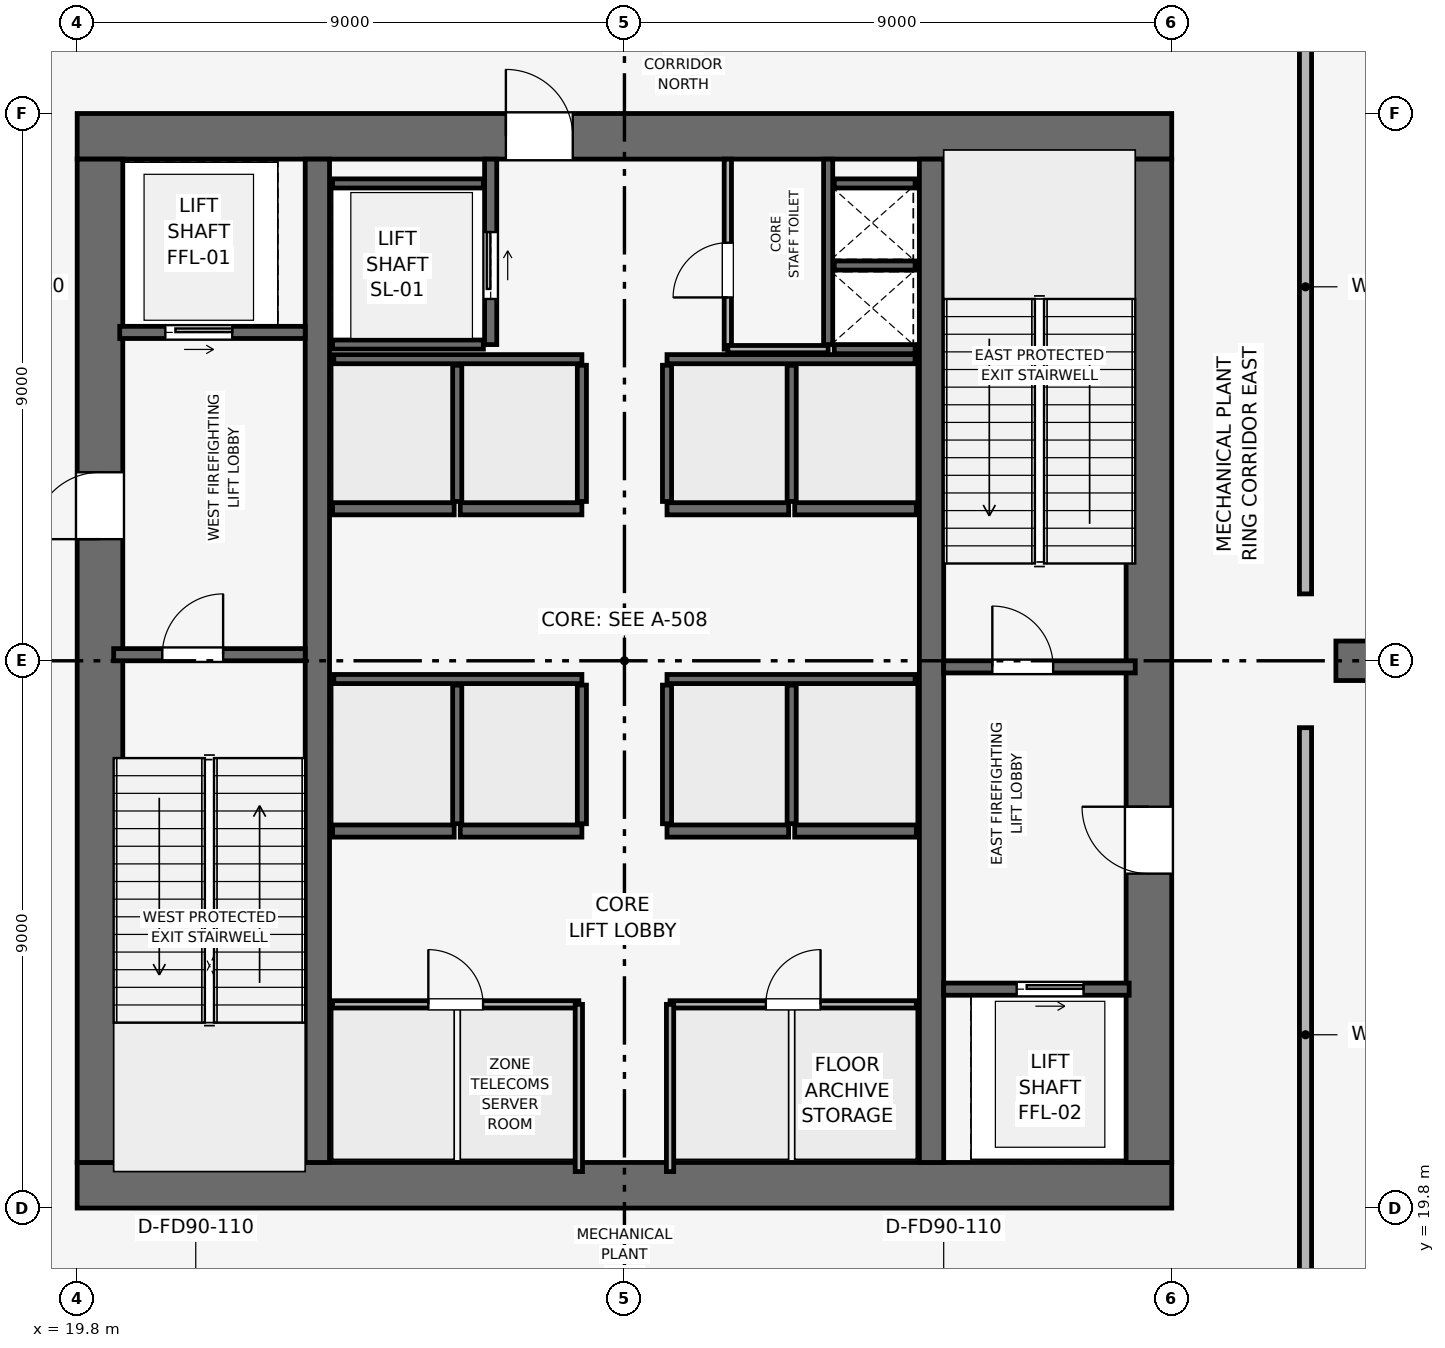
"""IFC4 building model, lengths in metres.
Left out: names, types, materials, properties, quantities, classifications, styles, units other than length and angle.
Written with IfcOpenShell. Run it as: python <this file> out.ifc"""

import sys

from ifc_helpers import new_model, si_unit, direction, frame, frame_2d, origin, place, context, subcontext, project, spatial, rectangle, extrude, element, fill, save


model = new_model("IFC4")
c1 = context("Model", 3, precision=1e-05, world=origin(), true_north=direction((0.0, 1.0)))
c2 = subcontext(c1, "Body", "Model", "MODEL_VIEW")
j1 = project(units=[si_unit("LENGTHUNIT", "METRE"), si_unit("PLANEANGLEUNIT", "RADIAN")], contexts=[c1])
p1 = place(None, origin())
s1 = spatial("IfcSite", under=j1, at=p1, CompositionType="ELEMENT")
p2 = place(p1, origin())
s2 = spatial("IfcBuilding", under=s1, at=p2, CompositionType="ELEMENT")
p3 = place(p2, frame((0.0, 0.0, 194.55)))
s3 = spatial("IfcBuildingStorey", under=s2, at=p3, CompositionType="ELEMENT", Elevation=194.55)
p4 = place(p3, frame((19.8, 20.175, 0.0), z_axis=(0.0, 0.0, 1.0), x_axis=(1.0, 0.0, 0.0)))
e1 = element("IfcWall", 1, at=p4, inside=s3, PredefinedType="SHEAR", context=c2, shape_type="SweptSolid", body=[
    extrude(rectangle(XDim=18.0, YDim=0.75, at=frame_2d((9.0, 0.0))), origin(), (0.0, 0.0, 1.0), 5.4),
])
p5 = place(p3, frame((19.8, 37.425, 0.0), z_axis=(0.0, 0.0, 1.0), x_axis=(1.0, 0.0, 0.0)))
e2 = element("IfcWall", 2, at=p5, inside=s3, PredefinedType="SHEAR", context=c2, shape_type="SweptSolid", body=[
    extrude(rectangle(XDim=18.0, YDim=0.75, at=frame_2d((9.0, 0.0))), origin(), (0.0, 0.0, 1.0), 5.4),
])
p6 = place(p5, frame((7.05, 0.0, 0.0)))
e3 = element("IfcOpeningElement", 3, at=p6, cuts=e2, PredefinedType="OPENING", context=c2, shape_type="SweptSolid", body=[
    extrude(rectangle(XDim=1.1, YDim=2.15, at=frame_2d((0.55, 1.075))), frame((0.0, 0.385, 0.0), z_axis=(0.0, -1.0, 0.0), x_axis=(1.0, 0.0, 0.0)), (0.0, 0.0, 1.0), 0.77),
])
p7 = place(p3, frame((20.175, 20.55, 0.0), z_axis=(0.0, 0.0, 1.0), x_axis=(0.0, 1.0, 0.0)))
e4 = element("IfcWall", 4, at=p7, inside=s3, PredefinedType="SHEAR", context=c2, shape_type="SweptSolid", body=[
    extrude(rectangle(XDim=16.5, YDim=0.75, at=frame_2d((8.25, 0.0))), origin(), (0.0, 0.0, 1.0), 5.4),
])
p8 = place(p7, frame((10.25, 0.0, 0.0)))
e5 = element("IfcOpeningElement", 5, at=p8, cuts=e4, PredefinedType="OPENING", context=c2, shape_type="SweptSolid", body=[
    extrude(rectangle(XDim=1.1, YDim=2.15, at=frame_2d((0.55, 1.075))), frame((0.0, 0.385, 0.0), z_axis=(0.0, -1.0, 0.0), x_axis=(1.0, 0.0, 0.0)), (0.0, 0.0, 1.0), 0.77),
])
p9 = place(p3, frame((37.425, 20.55, 0.0), z_axis=(0.0, 0.0, 1.0), x_axis=(0.0, 1.0, 0.0)))
e6 = element("IfcWall", 6, at=p9, inside=s3, PredefinedType="SHEAR", context=c2, shape_type="SweptSolid", body=[
    extrude(rectangle(XDim=16.5, YDim=0.75, at=frame_2d((8.25, 0.0))), origin(), (0.0, 0.0, 1.0), 5.4),
])
p10 = place(p9, frame((4.75, 0.0, 0.0)))
e7 = element("IfcOpeningElement", 7, at=p10, cuts=e6, PredefinedType="OPENING", context=c2, shape_type="SweptSolid", body=[
    extrude(rectangle(XDim=1.1, YDim=2.15, at=frame_2d((0.55, 1.075))), frame((0.0, 0.385, 0.0), z_axis=(0.0, -1.0, 0.0), x_axis=(1.0, 0.0, 0.0)), (0.0, 0.0, 1.0), 0.77),
])
for number, where, z_axis, x_axis in (
    (8, (23.75, 20.55, 0.0), (0.0, 0.0, 1.0), (0.0, 1.0, 0.0)),
    (9, (33.85, 20.55, 0.0), (0.0, 0.0, 1.0), (0.0, 1.0, 0.0)),
):
    element("IfcWall", number, at=place(p3, frame(where, z_axis=z_axis, x_axis=x_axis)), inside=s3, PredefinedType="SHEAR", context=c2, shape_type="SweptSolid", body=[
        extrude(rectangle(XDim=16.5, YDim=0.4, at=frame_2d((8.25, 0.0))), origin(), (0.0, 0.0, 1.0), 5.4),
    ])
p11 = place(p3, frame((40.5, 28.8, 0.0), z_axis=(0.0, 0.0, 1.0), x_axis=(1.0, 0.0, 0.0)))
e10 = element("IfcWall", 10, at=p11, inside=s3, PredefinedType="SHEAR", context=c2, shape_type="SweptSolid", body=[
    extrude(rectangle(XDim=12.35, YDim=0.65, at=frame_2d((6.175, 0.0))), origin(), (0.0, 0.0, 1.0), 5.15),
])
p12 = place(p3, frame((20.4, 28.9, 0.0), z_axis=(0.0, 0.0, 1.0), x_axis=(1.0, 0.0, 0.0)))
e11 = element("IfcWall", 11, at=p12, inside=s3, PredefinedType="SHEAR", context=c2, shape_type="SweptSolid", body=[
    extrude(rectangle(XDim=3.15, YDim=0.2, at=frame_2d((1.575, 0.0))), origin(), (0.0, 0.0, 1.0), 5.15),
])
p13 = place(p12, frame((0.8, 0.0, 0.0)))
e12 = element("IfcOpeningElement", 12, at=p13, cuts=e11, PredefinedType="OPENING", context=c2, shape_type="SweptSolid", body=[
    extrude(rectangle(XDim=1.0, YDim=2.1, at=frame_2d((0.5, 1.05))), frame((0.0, 0.11, 0.0), z_axis=(0.0, -1.0, 0.0), x_axis=(1.0, 0.0, 0.0)), (0.0, 0.0, 1.0), 0.22),
])
p14 = place(p3, frame((34.05, 28.7, 0.0), z_axis=(0.0, 0.0, 1.0), x_axis=(1.0, 0.0, 0.0)))
e13 = element("IfcWall", 13, at=p14, inside=s3, PredefinedType="SHEAR", context=c2, shape_type="SweptSolid", body=[
    extrude(rectangle(XDim=3.15, YDim=0.2, at=frame_2d((1.575, 0.0))), origin(), (0.0, 0.0, 1.0), 5.15),
])
p15 = place(p14, frame((0.8, 0.0, 0.0)))
e14 = element("IfcOpeningElement", 14, at=p15, cuts=e13, PredefinedType="OPENING", context=c2, shape_type="SweptSolid", body=[
    extrude(rectangle(XDim=1.0, YDim=2.1, at=frame_2d((0.5, 1.05))), frame((0.0, 0.11, 0.0), z_axis=(0.0, -1.0, 0.0), x_axis=(1.0, 0.0, 0.0)), (0.0, 0.0, 1.0), 0.22),
])
p16 = place(p3, frame((32.15, 34.0, 0.0), z_axis=(0.0, 0.0, 1.0), x_axis=(0.0, 1.0, 0.0)))
e15 = element("IfcWall", 15, at=p16, inside=s3, PredefinedType="SHEAR", context=c2, shape_type="SweptSolid", body=[
    extrude(rectangle(XDim=3.05, YDim=0.15, at=frame_2d((1.525, 0.0))), origin(), (0.0, 0.0, 1.0), 5.15),
])
for number, where, z_axis, x_axis in (
    (16, (32.25, 33.925, 0.0), (0.0, 0.0, 1.0), (1.0, 0.0, 0.0)),
    (17, (32.25, 35.3, 0.0), (0.0, 0.0, 1.0), (1.0, 0.0, 0.0)),
):
    element("IfcWall", number, at=place(p3, frame(where, z_axis=z_axis, x_axis=x_axis)), inside=s3, PredefinedType="SHEAR", context=c2, shape_type="SweptSolid", body=[
        extrude(rectangle(XDim=1.33, YDim=0.15, at=frame_2d((0.665, 0.0))), origin(), (0.0, 0.0, 1.0), 5.15),
    ])
p17 = place(p3, frame((20.5, 34.2, 0.0), z_axis=(0.0, 0.0, 1.0), x_axis=(1.0, 0.0, 0.0)))
e18 = element("IfcWall", 18, at=p17, inside=s3, PredefinedType="SHEAR", context=c2, shape_type="SweptSolid", body=[
    extrude(rectangle(XDim=3.05, YDim=0.2, at=frame_2d((1.525, 0.0))), origin(), (0.0, 0.0, 1.0), 5.15),
])
p18 = place(p17, frame((0.75, 0.0, 0.0)))
e19 = element("IfcOpeningElement", 19, at=p18, cuts=e18, PredefinedType="OPENING", context=c2, shape_type="SweptSolid", body=[
    extrude(rectangle(XDim=1.1, YDim=2.15, at=frame_2d((0.55, 1.075))), frame((0.0, 0.11, 0.0), z_axis=(0.0, -1.0, 0.0), x_axis=(1.0, 0.0, 0.0)), (0.0, 0.0, 1.0), 0.22),
])
p19 = place(p3, frame((34.05, 23.4, 0.0), z_axis=(0.0, 0.0, 1.0), x_axis=(1.0, 0.0, 0.0)))
e20 = element("IfcWall", 20, at=p19, inside=s3, PredefinedType="SHEAR", context=c2, shape_type="SweptSolid", body=[
    extrude(rectangle(XDim=3.05, YDim=0.2, at=frame_2d((1.525, 0.0))), origin(), (0.0, 0.0, 1.0), 5.15),
])
p20 = place(p19, frame((1.2, 0.0, 0.0)))
e21 = element("IfcOpeningElement", 21, at=p20, cuts=e20, PredefinedType="OPENING", context=c2, shape_type="SweptSolid", body=[
    extrude(rectangle(XDim=1.1, YDim=2.15, at=frame_2d((0.55, 1.075))), frame((0.0, 0.11, 0.0), z_axis=(0.0, -1.0, 0.0), x_axis=(1.0, 0.0, 0.0)), (0.0, 0.0, 1.0), 0.22),
])
p21 = place(p3, frame((26.6, 34.0, 0.0), z_axis=(0.0, 0.0, 1.0), x_axis=(0.0, 1.0, 0.0)))
e22 = element("IfcWall", 22, at=p21, inside=s3, PredefinedType="SHEAR", context=c2, shape_type="SweptSolid", body=[
    extrude(rectangle(XDim=3.05, YDim=0.2, at=frame_2d((1.525, 0.0))), origin(), (0.0, 0.0, 1.0), 5.15),
])
p22 = place(p21, frame((0.75, 0.0, 0.0)))
e23 = element("IfcOpeningElement", 23, at=p22, cuts=e22, PredefinedType="OPENING", context=c2, shape_type="SweptSolid", body=[
    extrude(rectangle(XDim=1.1, YDim=2.15, at=frame_2d((0.55, 1.075))), frame((0.0, 0.11, 0.0), z_axis=(0.0, -1.0, 0.0), x_axis=(1.0, 0.0, 0.0)), (0.0, 0.0, 1.0), 0.22),
])
for number, where, z_axis, x_axis in (
    (24, (24.0, 34.0, 0.0), (0.0, 0.0, 1.0), (1.0, 0.0, 0.0)),
    (25, (24.0, 36.65, 0.0), (0.0, 0.0, 1.0), (1.0, 0.0, 0.0)),
):
    element("IfcWall", number, at=place(p3, frame(where, z_axis=z_axis, x_axis=x_axis)), inside=s3, PredefinedType="SHEAR", context=c2, shape_type="SweptSolid", body=[
        extrude(rectangle(XDim=2.48, YDim=0.15, at=frame_2d((1.24, 0.0))), origin(), (0.0, 0.0, 1.0), 5.15),
    ])
for number, where, z_axis, x_axis in (
    (26, (24.0, 26.0, 0.0), (0.0, 0.0, 1.0), (1.0, 0.0, 0.0)),
    (27, (26.1, 26.0, 0.0), (0.0, 0.0, 1.0), (1.0, 0.0, 0.0)),
    (28, (29.5, 26.0, 0.0), (0.0, 0.0, 1.0), (1.0, 0.0, 0.0)),
    (29, (31.6, 26.0, 0.0), (0.0, 0.0, 1.0), (1.0, 0.0, 0.0)),
    (30, (24.0, 31.3, 0.0), (0.0, 0.0, 1.0), (1.0, 0.0, 0.0)),
    (31, (26.1, 31.3, 0.0), (0.0, 0.0, 1.0), (1.0, 0.0, 0.0)),
    (32, (29.5, 31.3, 0.0), (0.0, 0.0, 1.0), (1.0, 0.0, 0.0)),
    (33, (31.6, 31.3, 0.0), (0.0, 0.0, 1.0), (1.0, 0.0, 0.0)),
):
    element("IfcWall", number, at=place(p3, frame(where, z_axis=z_axis, x_axis=x_axis)), inside=s3, PredefinedType="SHEAR", context=c2, shape_type="SweptSolid", body=[
        extrude(rectangle(XDim=2.0, YDim=0.2, at=frame_2d((1.0, 0.0))), origin(), (0.0, 0.0, 1.0), 5.15),
    ])
p23 = place(p3, frame((32.25, 36.65, 0.0), z_axis=(0.0, 0.0, 1.0), x_axis=(1.0, 0.0, 0.0)))
e34 = element("IfcWall", 34, at=p23, inside=s3, PredefinedType="SHEAR", context=c2, shape_type="SweptSolid", body=[
    extrude(rectangle(XDim=1.33, YDim=0.15, at=frame_2d((0.665, 0.0))), origin(), (0.0, 0.0, 1.0), 5.15),
])
for number, where, z_axis, x_axis in (
    (35, (24.02, 28.5, 0.0), (0.0, 0.0, 1.0), (1.0, 0.0, 0.0)),
    (36, (29.5, 28.5, 0.0), (0.0, 0.0, 1.0), (1.0, 0.0, 0.0)),
):
    element("IfcWall", number, at=place(p3, frame(where, z_axis=z_axis, x_axis=x_axis)), inside=s3, PredefinedType="SHEAR", context=c2, shape_type="SweptSolid", body=[
        extrude(rectangle(XDim=4.08, YDim=0.15, at=frame_2d((2.04, 0.0))), origin(), (0.0, 0.0, 1.0), 5.15),
    ])
for number, where, z_axis, x_axis in (
    (37, (26.05, 26.12, 0.0), (0.0, 0.0, 1.0), (0.0, 1.0, 0.0)),
    (38, (28.1, 26.12, 0.0), (0.0, 0.0, 1.0), (0.0, 1.0, 0.0)),
    (39, (29.5, 26.12, 0.0), (0.0, 0.0, 1.0), (0.0, 1.0, 0.0)),
    (40, (31.55, 26.12, 0.0), (0.0, 0.0, 1.0), (0.0, 1.0, 0.0)),
):
    element("IfcWall", number, at=place(p3, frame(where, z_axis=z_axis, x_axis=x_axis)), inside=s3, PredefinedType="SHEAR", context=c2, shape_type="SweptSolid", body=[
        extrude(rectangle(XDim=2.28, YDim=0.15, at=frame_2d((1.14, 0.0))), origin(), (0.0, 0.0, 1.0), 5.15),
    ])
for number, where, z_axis, x_axis in (
    (41, (24.02, 33.76, 0.0), (0.0, 0.0, 1.0), (1.0, 0.0, 0.0)),
    (42, (29.5, 33.76, 0.0), (0.0, 0.0, 1.0), (1.0, 0.0, 0.0)),
):
    element("IfcWall", number, at=place(p3, frame(where, z_axis=z_axis, x_axis=x_axis)), inside=s3, PredefinedType="SHEAR", context=c2, shape_type="SweptSolid", body=[
        extrude(rectangle(XDim=4.08, YDim=0.15, at=frame_2d((2.04, 0.0))), origin(), (0.0, 0.0, 1.0), 5.15),
    ])
for number, where, z_axis, x_axis in (
    (43, (26.05, 31.42, 0.0), (0.0, 0.0, 1.0), (0.0, 1.0, 0.0)),
    (44, (28.1, 31.42, 0.0), (0.0, 0.0, 1.0), (0.0, 1.0, 0.0)),
    (45, (29.5, 31.42, 0.0), (0.0, 0.0, 1.0), (0.0, 1.0, 0.0)),
    (46, (31.55, 31.42, 0.0), (0.0, 0.0, 1.0), (0.0, 1.0, 0.0)),
):
    element("IfcWall", number, at=place(p3, frame(where, z_axis=z_axis, x_axis=x_axis)), inside=s3, PredefinedType="SHEAR", context=c2, shape_type="SweptSolid", body=[
        extrude(rectangle(XDim=2.24, YDim=0.15, at=frame_2d((1.12, 0.0))), origin(), (0.0, 0.0, 1.0), 5.15),
    ])
p24 = place(p3, frame((30.5, 33.925, 0.0), z_axis=(0.0, 0.0, 1.0), x_axis=(0.0, 1.0, 0.0)))
e47 = element("IfcWall", 47, at=p24, inside=s3, PredefinedType="PARTITIONING", context=c2, shape_type="SweptSolid", body=[
    extrude(rectangle(XDim=3.125, YDim=0.12, at=frame_2d((1.562, 0.0))), origin(), (0.0, 0.0, 1.0), 5.15),
])
p25 = place(p24, frame((0.85, 0.0, 0.0)))
e48 = element("IfcOpeningElement", 48, at=p25, cuts=e47, PredefinedType="OPENING", context=c2, shape_type="SweptSolid", body=[
    extrude(rectangle(XDim=0.9, YDim=2.1, at=frame_2d((0.45, 1.05))), frame((0.0, 0.07, 0.0), z_axis=(0.0, -1.0, 0.0), x_axis=(1.0, 0.0, 0.0)), (0.0, 0.0, 1.0), 0.14),
])
p26 = place(p3, frame((30.5, 33.925, 0.0), z_axis=(0.0, 0.0, 1.0), x_axis=(1.0, 0.0, 0.0)))
e49 = element("IfcWall", 49, at=p26, inside=s3, PredefinedType="PARTITIONING", context=c2, shape_type="SweptSolid", body=[
    extrude(rectangle(XDim=1.65, YDim=0.12, at=frame_2d((0.825, 0.0))), origin(), (0.0, 0.0, 1.0), 5.15),
])
p27 = place(p3, frame((24.0, 23.15, 0.0), z_axis=(0.0, 0.0, 1.0), x_axis=(1.0, 0.0, 0.0)))
e50 = element("IfcWall", 50, at=p27, inside=s3, PredefinedType="PARTITIONING", context=c2, shape_type="SweptSolid", body=[
    extrude(rectangle(XDim=4.05, YDim=0.12, at=frame_2d((2.025, 0.0))), origin(), (0.0, 0.0, 1.0), 5.15),
])
p28 = place(p27, frame((1.575, 0.0, 0.0)))
e51 = element("IfcOpeningElement", 51, at=p28, cuts=e50, PredefinedType="OPENING", context=c2, shape_type="SweptSolid", body=[
    extrude(rectangle(XDim=0.9, YDim=2.1, at=frame_2d((0.45, 1.05))), frame((0.0, 0.07, 0.0), z_axis=(0.0, -1.0, 0.0), x_axis=(1.0, 0.0, 0.0)), (0.0, 0.0, 1.0), 0.14),
])
p29 = place(p3, frame((28.05, 20.4, 0.0), z_axis=(0.0, 0.0, 1.0), x_axis=(0.0, 1.0, 0.0)))
e52 = element("IfcWall", 52, at=p29, inside=s3, PredefinedType="PARTITIONING", context=c2, shape_type="SweptSolid", body=[
    extrude(rectangle(XDim=2.75, YDim=0.12, at=frame_2d((1.375, 0.0))), origin(), (0.0, 0.0, 1.0), 5.15),
])
p30 = place(p3, frame((29.55, 23.15, 0.0), z_axis=(0.0, 0.0, 1.0), x_axis=(1.0, 0.0, 0.0)))
e53 = element("IfcWall", 53, at=p30, inside=s3, PredefinedType="PARTITIONING", context=c2, shape_type="SweptSolid", body=[
    extrude(rectangle(XDim=4.05, YDim=0.12, at=frame_2d((2.025, 0.0))), origin(), (0.0, 0.0, 1.0), 5.15),
])
p31 = place(p30, frame((1.575, 0.0, 0.0)))
e54 = element("IfcOpeningElement", 54, at=p31, cuts=e53, PredefinedType="OPENING", context=c2, shape_type="SweptSolid", body=[
    extrude(rectangle(XDim=0.9, YDim=2.1, at=frame_2d((0.45, 1.05))), frame((0.0, 0.07, 0.0), z_axis=(0.0, -1.0, 0.0), x_axis=(1.0, 0.0, 0.0)), (0.0, 0.0, 1.0), 0.14),
])
p32 = place(p3, frame((29.55, 20.4, 0.0), z_axis=(0.0, 0.0, 1.0), x_axis=(0.0, 1.0, 0.0)))
e55 = element("IfcWall", 55, at=p32, inside=s3, PredefinedType="PARTITIONING", context=c2, shape_type="SweptSolid", body=[
    extrude(rectangle(XDim=2.75, YDim=0.12, at=frame_2d((1.375, 0.0))), origin(), (0.0, 0.0, 1.0), 5.15),
])
p33 = place(p3, frame((40.0, 17.6, 0.0), z_axis=(0.0, 0.0, 1.0), x_axis=(0.0, 1.0, 0.0)))
e56 = element("IfcWall", 56, at=p33, inside=s3, PredefinedType="PARTITIONING", context=c2, shape_type="SweptSolid", body=[
    extrude(rectangle(XDim=10.1, YDim=0.2, at=frame_2d((5.05, 0.0))), origin(), (0.0, 0.0, 1.0), 4.685),
])
p34 = place(p3, frame((40.0, 29.9, 0.0), z_axis=(0.0, 0.0, 1.0), x_axis=(0.0, 1.0, 0.0)))
e57 = element("IfcWall", 57, at=p34, inside=s3, PredefinedType="PARTITIONING", context=c2, shape_type="SweptSolid", body=[
    extrude(rectangle(XDim=10.1, YDim=0.2, at=frame_2d((5.05, 0.0))), origin(), (0.0, 0.0, 1.0), 4.685),
])
p35 = place(p13, origin())
e58 = element("IfcDoor", 58, at=p35, inside=s3, OperationType="SINGLE_SWING_RIGHT", PredefinedType="DOOR", context=c2, shape_type="SweptSolid", body=[
    extrude(rectangle(XDim=1.0, YDim=2.1, at=frame_2d((0.5, 1.05))), frame((0.0, 0.025, 0.0), z_axis=(0.0, -1.0, 0.0), x_axis=(1.0, 0.0, 0.0)), (0.0, 0.0, 1.0), 0.05),
])
fill(e12, e58)
p36 = place(p15, origin())
e59 = element("IfcDoor", 59, at=p36, inside=s3, OperationType="SINGLE_SWING_LEFT", PredefinedType="DOOR", context=c2, shape_type="SweptSolid", body=[
    extrude(rectangle(XDim=1.0, YDim=2.1, at=frame_2d((0.5, 1.05))), frame((0.0, 0.025, 0.0), z_axis=(0.0, -1.0, 0.0), x_axis=(1.0, 0.0, 0.0)), (0.0, 0.0, 1.0), 0.05),
])
fill(e14, e59)
p37 = place(p18, origin())
e60 = element("IfcDoor", 60, at=p37, inside=s3, OperationType="SLIDING_TO_RIGHT", PredefinedType="DOOR", context=c2, shape_type="SweptSolid", body=[
    extrude(rectangle(XDim=1.1, YDim=2.15, at=frame_2d((0.55, 1.075))), frame((0.0, 0.025, 0.0), z_axis=(0.0, -1.0, 0.0), x_axis=(1.0, 0.0, 0.0)), (0.0, 0.0, 1.0), 0.05),
])
fill(e19, e60)
p38 = place(p20, origin())
e61 = element("IfcDoor", 61, at=p38, inside=s3, OperationType="SLIDING_TO_RIGHT", PredefinedType="DOOR", context=c2, shape_type="SweptSolid", body=[
    extrude(rectangle(XDim=1.1, YDim=2.15, at=frame_2d((0.55, 1.075))), frame((0.0, 0.025, 0.0), z_axis=(0.0, -1.0, 0.0), x_axis=(1.0, 0.0, 0.0)), (0.0, 0.0, 1.0), 0.05),
])
fill(e21, e61)
p39 = place(p22, origin())
e62 = element("IfcDoor", 62, at=p39, inside=s3, OperationType="SLIDING_TO_RIGHT", PredefinedType="DOOR", context=c2, shape_type="SweptSolid", body=[
    extrude(rectangle(XDim=1.1, YDim=2.15, at=frame_2d((0.55, 1.075))), frame((0.0, 0.025, 0.0), z_axis=(0.0, -1.0, 0.0), x_axis=(1.0, 0.0, 0.0)), (0.0, 0.0, 1.0), 0.05),
])
fill(e23, e62)
p40 = place(p25, origin())
e63 = element("IfcDoor", 63, at=p40, inside=s3, OperationType="SINGLE_SWING_LEFT", PredefinedType="DOOR", context=c2, shape_type="SweptSolid", body=[
    extrude(rectangle(XDim=0.9, YDim=2.1, at=frame_2d((0.45, 1.05))), frame((0.0, 0.025, 0.0), z_axis=(0.0, -1.0, 0.0), x_axis=(1.0, 0.0, 0.0)), (0.0, 0.0, 1.0), 0.05),
])
fill(e48, e63)
p41 = place(p28, origin())
e64 = element("IfcDoor", 64, at=p41, inside=s3, OperationType="SINGLE_SWING_LEFT", PredefinedType="DOOR", context=c2, shape_type="SweptSolid", body=[
    extrude(rectangle(XDim=0.9, YDim=2.1, at=frame_2d((0.45, 1.05))), frame((0.0, 0.025, 0.0), z_axis=(0.0, -1.0, 0.0), x_axis=(1.0, 0.0, 0.0)), (0.0, 0.0, 1.0), 0.05),
])
fill(e51, e64)
p42 = place(p31, origin())
e65 = element("IfcDoor", 65, at=p42, inside=s3, OperationType="SINGLE_SWING_RIGHT", PredefinedType="DOOR", context=c2, shape_type="SweptSolid", body=[
    extrude(rectangle(XDim=0.9, YDim=2.1, at=frame_2d((0.45, 1.05))), frame((0.0, 0.025, 0.0), z_axis=(0.0, -1.0, 0.0), x_axis=(1.0, 0.0, 0.0)), (0.0, 0.0, 1.0), 0.05),
])
fill(e54, e65)
p43 = place(p8, origin())
e66 = element("IfcDoor", 66, at=p43, inside=s3, OperationType="SINGLE_SWING_LEFT", PredefinedType="DOOR", context=c2, shape_type="SweptSolid", body=[
    extrude(rectangle(XDim=1.1, YDim=2.15, at=frame_2d((0.55, 1.075))), frame((0.0, 0.025, 0.0), z_axis=(0.0, -1.0, 0.0), x_axis=(1.0, 0.0, 0.0)), (0.0, 0.0, 1.0), 0.05),
])
fill(e5, e66)
p44 = place(p10, origin())
e67 = element("IfcDoor", 67, at=p44, inside=s3, OperationType="SINGLE_SWING_RIGHT", PredefinedType="DOOR", context=c2, shape_type="SweptSolid", body=[
    extrude(rectangle(XDim=1.1, YDim=2.15, at=frame_2d((0.55, 1.075))), frame((0.0, 0.025, 0.0), z_axis=(0.0, -1.0, 0.0), x_axis=(1.0, 0.0, 0.0)), (0.0, 0.0, 1.0), 0.05),
])
fill(e7, e67)
p45 = place(p6, origin())
e68 = element("IfcDoor", 68, at=p45, inside=s3, OperationType="SINGLE_SWING_LEFT", PredefinedType="DOOR", context=c2, shape_type="SweptSolid", body=[
    extrude(rectangle(XDim=1.1, YDim=2.15, at=frame_2d((0.55, 1.075))), frame((0.0, 0.025, 0.0), z_axis=(0.0, -1.0, 0.0), x_axis=(1.0, 0.0, 0.0)), (0.0, 0.0, 1.0), 0.05),
])
fill(e3, e68)
save(model, sys.argv[1])
